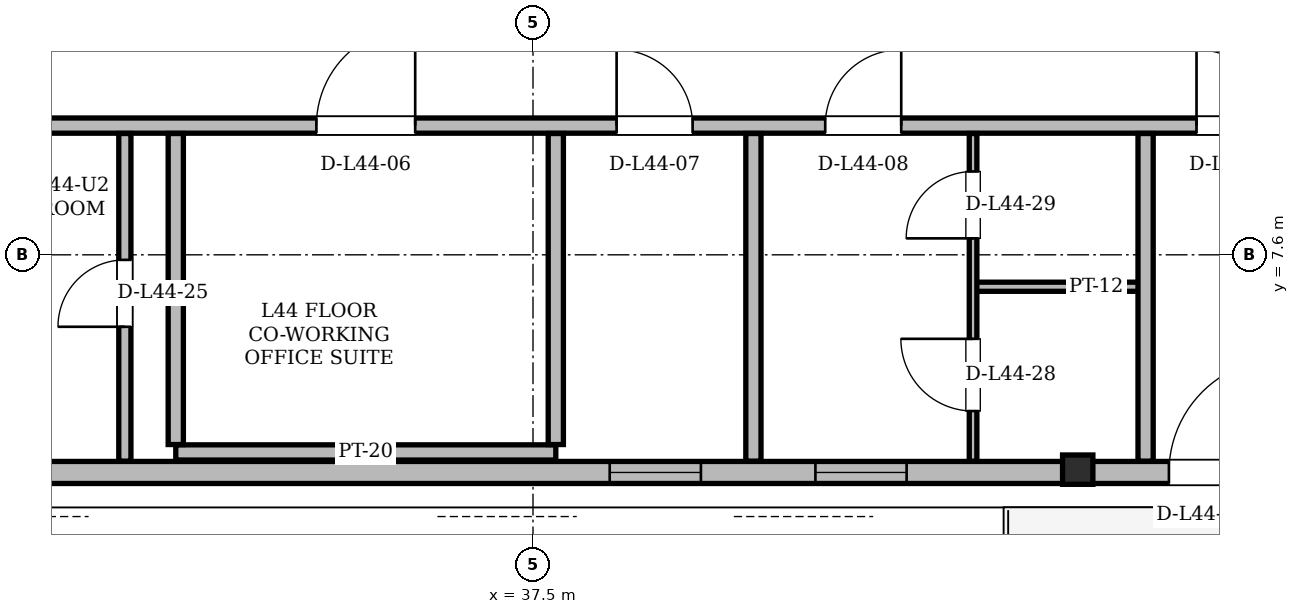
"""IFC4 building model, lengths in metres.
Left out: names, types, materials, properties, quantities, classifications, styles, units other than length and angle.
Written with IfcOpenShell. Run it as: python <this file> out.ifc"""

import sys

from ifc_helpers import new_model, si_unit, direction, frame, frame_2d, origin, origin_2d, place, context, subcontext, project, spatial, rectangle, i_section, extrude, element, fill, save


model = new_model("IFC4")
c1 = context("Model", 3, precision=1e-05, world=origin(), true_north=direction((0.0, 1.0)))
c2 = subcontext(c1, "Body", "Model", "MODEL_VIEW")
j1 = project(units=[si_unit("LENGTHUNIT", "METRE"), si_unit("PLANEANGLEUNIT", "RADIAN")], contexts=[c1])
p1 = place(None, origin())
s1 = spatial("IfcSite", under=j1, at=p1, CompositionType="ELEMENT")
p2 = place(p1, origin())
s2 = spatial("IfcBuilding", under=s1, at=p2, CompositionType="ELEMENT")
p3 = place(p2, frame((0.0, 0.0, 167.4)))
s3 = spatial("IfcBuildingStorey", under=s2, at=p3, CompositionType="ELEMENT", Elevation=167.4)
p4 = place(p3, frame((44.66, 4.737, 0.005), z_axis=(0.003602448474, 0.020595129955, 0.999781407602), x_axis=(-0.985044264362, 0.172301471984, 0.0)))
e1 = element("IfcColumn", 1, at=p4, inside=s3, PredefinedType="COLUMN", context=c2, shape_type="SweptSolid", body=[
    extrude(i_section(OverallWidth=0.399, OverallDepth=0.386, WebThickness=0.021, FlangeThickness=0.033, at=origin_2d()), origin(), (0.0, 0.0, 1.0), 3.592),
])
p5 = place(p3, frame((19.599, 4.737, 0.0), z_axis=(0.0, 0.0, 1.0), x_axis=(1.0, 0.0, 0.0)))
e2 = element("IfcWall", 2, at=p5, inside=s3, PredefinedType="SOLIDWALL", context=c2, shape_type="SweptSolid", body=[
    extrude(rectangle(XDim=35.803, YDim=0.29, at=frame_2d((17.901, 0.0))), origin(), (0.0, 0.0, 1.0), 2.6),
])
p6 = place(p5, frame((6.579, 0.0, 0.0)))
e3 = element("IfcOpeningElement", 3, at=p6, cuts=e2, PredefinedType="OPENING", context=c2, shape_type="SweptSolid", body=[
    extrude(rectangle(XDim=1.5, YDim=2.2, at=frame_2d((0.75, 1.1))), frame((0.0, 0.145, 0.0), z_axis=(0.0, -1.0, 0.0), x_axis=(1.0, 0.0, 0.0)), (0.0, 0.0, 1.0), 0.29),
])
p7 = place(p5, frame((26.268, 0.0, 0.0)))
e4 = element("IfcOpeningElement", 4, at=p7, cuts=e2, PredefinedType="OPENING", context=c2, shape_type="SweptSolid", body=[
    extrude(rectangle(XDim=1.5, YDim=2.2, at=frame_2d((0.75, 1.1))), frame((0.0, 0.145, 0.0), z_axis=(0.0, -1.0, 0.0), x_axis=(1.0, 0.0, 0.0)), (0.0, 0.0, 1.0), 0.29),
])
p8 = place(p5, frame((0.86, 0.0, 0.85)))
e5 = element("IfcOpeningElement", 5, at=p8, cuts=e2, PredefinedType="OPENING", context=c2, shape_type="SweptSolid", body=[
    extrude(rectangle(XDim=1.2, YDim=1.48, at=frame_2d((0.6, 0.74))), frame((0.0, 0.145, 0.0), z_axis=(0.0, -1.0, 0.0), x_axis=(1.0, 0.0, 0.0)), (0.0, 0.0, 1.0), 0.29),
])
p9 = place(p5, frame((8.588, 0.0, 0.85)))
e6 = element("IfcOpeningElement", 6, at=p9, cuts=e2, PredefinedType="OPENING", context=c2, shape_type="SweptSolid", body=[
    extrude(rectangle(XDim=1.2, YDim=1.48, at=frame_2d((0.6, 0.74))), frame((0.0, 0.145, 0.0), z_axis=(0.0, -1.0, 0.0), x_axis=(1.0, 0.0, 0.0)), (0.0, 0.0, 1.0), 0.29),
])
p10 = place(p5, frame((18.91, 0.0, 0.85)))
e7 = element("IfcOpeningElement", 7, at=p10, cuts=e2, PredefinedType="OPENING", context=c2, shape_type="SweptSolid", body=[
    extrude(rectangle(XDim=1.2, YDim=1.48, at=frame_2d((0.6, 0.74))), frame((0.0, 0.145, 0.0), z_axis=(0.0, -1.0, 0.0), x_axis=(1.0, 0.0, 0.0)), (0.0, 0.0, 1.0), 0.29),
])
p11 = place(p5, frame((31.267, 0.0, 0.85)))
e8 = element("IfcOpeningElement", 8, at=p11, cuts=e2, PredefinedType="OPENING", context=c2, shape_type="SweptSolid", body=[
    extrude(rectangle(XDim=3.0, YDim=1.64, at=frame_2d((1.5, 0.82))), frame((0.0, 0.145, 0.0), z_axis=(0.0, -1.0, 0.0), x_axis=(1.0, 0.0, 0.0)), (0.0, 0.0, 1.0), 0.29),
])
p12 = place(p5, frame((21.617, 0.0, 0.85)))
e9 = element("IfcOpeningElement", 9, at=p12, cuts=e2, PredefinedType="OPENING", context=c2, shape_type="SweptSolid", body=[
    extrude(rectangle(XDim=1.2, YDim=1.48, at=frame_2d((0.6, 0.74))), frame((0.0, 0.145, 0.0), z_axis=(0.0, -1.0, 0.0), x_axis=(1.0, 0.0, 0.0)), (0.0, 0.0, 1.0), 0.29),
])
p13 = place(p3, frame((32.8, 5.0, 0.0), z_axis=(0.0, 0.0, 1.0), x_axis=(1.0, 0.0, 0.0)))
e10 = element("IfcWall", 10, at=p13, inside=s3, PredefinedType="PARTITIONING", context=c2, shape_type="SweptSolid", body=[
    extrude(rectangle(XDim=5.0, YDim=0.2, at=frame_2d((2.5, 0.0))), origin(), (0.0, 0.0, 1.0), 2.6),
])
p14 = place(p3, frame((43.29, 7.18, 0.0), z_axis=(0.0, 0.0, 1.0), x_axis=(1.0, 0.0, 0.0)))
e11 = element("IfcWall", 11, at=p14, inside=s3, PredefinedType="PARTITIONING", context=c2, shape_type="SweptSolid", body=[
    extrude(rectangle(XDim=2.321, YDim=0.12, at=frame_2d((1.16, 0.0))), origin(), (0.0, 0.0, 1.0), 3.38),
])
p15 = place(p3, frame((27.55, 9.3, 0.0), z_axis=(0.0, 0.0, 1.0), x_axis=(1.0, 0.0, 0.0)))
e12 = element("IfcWall", 12, at=p15, inside=s3, PredefinedType="PARTITIONING", context=c2, shape_type="SweptSolid", body=[
    extrude(rectangle(XDim=21.25, YDim=0.2, at=frame_2d((10.625, 0.0))), origin(), (0.0, 0.0, 1.0), 2.842),
])
p16 = place(p15, frame((0.429, 0.0, 0.0)))
e13 = element("IfcOpeningElement", 13, at=p16, cuts=e12, PredefinedType="OPENING", context=c2, shape_type="SweptSolid", body=[
    extrude(rectangle(XDim=1.0, YDim=2.18, at=frame_2d((0.5, 1.09))), frame((0.0, 0.1, 0.0), z_axis=(0.0, -1.0, 0.0), x_axis=(1.0, 0.0, 0.0)), (0.0, 0.0, 1.0), 0.2),
])
p17 = place(p15, frame((7.1, 0.0, 0.0)))
e14 = element("IfcOpeningElement", 14, at=p17, cuts=e12, PredefinedType="OPENING", context=c2, shape_type="SweptSolid", body=[
    extrude(rectangle(XDim=1.3, YDim=2.2, at=frame_2d((0.65, 1.1))), frame((0.0, 0.1, 0.0), z_axis=(0.0, -1.0, 0.0), x_axis=(1.0, 0.0, 0.0)), (0.0, 0.0, 1.0), 0.2),
])
p18 = place(p15, frame((11.05, 0.0, 0.0)))
e15 = element("IfcOpeningElement", 15, at=p18, cuts=e12, PredefinedType="OPENING", context=c2, shape_type="SweptSolid", body=[
    extrude(rectangle(XDim=1.0, YDim=2.18, at=frame_2d((0.5, 1.09))), frame((0.0, 0.1, 0.0), z_axis=(0.0, -1.0, 0.0), x_axis=(1.0, 0.0, 0.0)), (0.0, 0.0, 1.0), 0.2),
])
p19 = place(p15, frame((13.795, 0.0, 0.0)))
e16 = element("IfcOpeningElement", 16, at=p19, cuts=e12, PredefinedType="OPENING", context=c2, shape_type="SweptSolid", body=[
    extrude(rectangle(XDim=1.0, YDim=2.18, at=frame_2d((0.5, 1.09))), frame((0.0, 0.1, 0.0), z_axis=(0.0, -1.0, 0.0), x_axis=(1.0, 0.0, 0.0)), (0.0, 0.0, 1.0), 0.2),
])
p20 = place(p15, frame((18.68, 0.0, 0.0)))
e17 = element("IfcOpeningElement", 17, at=p20, cuts=e12, PredefinedType="OPENING", context=c2, shape_type="SweptSolid", body=[
    extrude(rectangle(XDim=1.0, YDim=2.18, at=frame_2d((0.5, 1.09))), frame((0.0, 0.1, 0.0), z_axis=(0.0, -1.0, 0.0), x_axis=(1.0, 0.0, 0.0)), (0.0, 0.0, 1.0), 0.2),
])
p21 = place(p3, frame((32.13, 4.885, 0.0), z_axis=(0.0, 0.0, 1.0), x_axis=(0.0, 1.0, 0.0)))
e18 = element("IfcWall", 18, at=p21, inside=s3, PredefinedType="PARTITIONING", context=c2, shape_type="SweptSolid", body=[
    extrude(rectangle(XDim=4.311, YDim=0.16, at=frame_2d((2.155, 0.0))), origin(), (0.0, 0.0, 1.0), 2.966),
])
p22 = place(p21, frame((1.768, 0.0, 0.0)))
e19 = element("IfcOpeningElement", 19, at=p22, cuts=e18, PredefinedType="OPENING", context=c2, shape_type="SweptSolid", body=[
    extrude(rectangle(XDim=0.88, YDim=2.08, at=frame_2d((0.44, 1.04))), frame((0.0, 0.08, 0.0), z_axis=(0.0, -1.0, 0.0), x_axis=(1.0, 0.0, 0.0)), (0.0, 0.0, 1.0), 0.16),
])
p23 = place(p3, frame((32.8, 5.104, 0.0), z_axis=(0.0, 0.0, 1.0), x_axis=(0.0, 1.0, 0.0)))
e20 = element("IfcWall", 20, at=p23, inside=s3, PredefinedType="PARTITIONING", context=c2, shape_type="SweptSolid", body=[
    extrude(rectangle(XDim=4.092, YDim=0.2, at=frame_2d((2.046, 0.0))), origin(), (0.0, 0.0, 1.0), 2.966),
])
p24 = place(p3, frame((37.8, 5.104, 0.0), z_axis=(0.0, 0.0, 1.0), x_axis=(0.0, 1.0, 0.0)))
e21 = element("IfcWall", 21, at=p24, inside=s3, PredefinedType="PARTITIONING", context=c2, shape_type="SweptSolid", body=[
    extrude(rectangle(XDim=4.092, YDim=0.2, at=frame_2d((2.046, 0.0))), origin(), (0.0, 0.0, 1.0), 3.38),
])
p25 = place(p3, frame((40.4, 4.885, 0.0), z_axis=(0.0, 0.0, 1.0), x_axis=(0.0, 1.0, 0.0)))
e22 = element("IfcWall", 22, at=p25, inside=s3, PredefinedType="PARTITIONING", context=c2, shape_type="SweptSolid", body=[
    extrude(rectangle(XDim=4.311, YDim=0.2, at=frame_2d((2.155, 0.0))), origin(), (0.0, 0.0, 1.0), 3.38),
])
p26 = place(p3, frame((43.29, 4.885, 0.0), z_axis=(0.0, 0.0, 1.0), x_axis=(0.0, 1.0, 0.0)))
e23 = element("IfcWall", 23, at=p26, inside=s3, PredefinedType="PARTITIONING", context=c2, shape_type="SweptSolid", body=[
    extrude(rectangle(XDim=4.311, YDim=0.1, at=frame_2d((2.155, 0.0))), origin(), (0.0, 0.0, 1.0), 2.966),
])
p27 = place(p26, frame((0.659, 0.0, 0.0)))
e24 = element("IfcOpeningElement", 24, at=p27, cuts=e23, PredefinedType="OPENING", context=c2, shape_type="SweptSolid", body=[
    extrude(rectangle(XDim=0.95, YDim=2.1, at=frame_2d((0.475, 1.05))), frame((0.0, 0.05, 0.0), z_axis=(0.0, -1.0, 0.0), x_axis=(1.0, 0.0, 0.0)), (0.0, 0.0, 1.0), 0.1),
])
p28 = place(p26, frame((2.931, 0.0, 0.0)))
e25 = element("IfcOpeningElement", 25, at=p28, cuts=e23, PredefinedType="OPENING", context=c2, shape_type="SweptSolid", body=[
    extrude(rectangle(XDim=0.88, YDim=2.08, at=frame_2d((0.44, 1.04))), frame((0.0, 0.05, 0.0), z_axis=(0.0, -1.0, 0.0), x_axis=(1.0, 0.0, 0.0)), (0.0, 0.0, 1.0), 0.1),
])
p29 = place(p3, frame((45.56, 4.885, 0.0), z_axis=(0.0, 0.0, 1.0), x_axis=(0.0, 1.0, 0.0)))
e26 = element("IfcWall", 26, at=p29, inside=s3, PredefinedType="PARTITIONING", context=c2, shape_type="SweptSolid", body=[
    extrude(rectangle(XDim=4.311, YDim=0.2, at=frame_2d((2.155, 0.0))), origin(), (0.0, 0.0, 1.0), 2.966),
])
p30 = place(p7, origin())
e27 = element("IfcDoor", 27, at=p30, inside=s3, OperationType="SINGLE_SWING_RIGHT", PredefinedType="DOOR", context=c2, shape_type="SweptSolid", body=[
    extrude(rectangle(XDim=1.5, YDim=2.2, at=frame_2d((0.75, 1.1))), frame((0.0, 0.025, 0.0), z_axis=(0.0, -1.0, 0.0), x_axis=(1.0, 0.0, 0.0)), (0.0, 0.0, 1.0), 0.05),
])
fill(e4, e27)
p31 = place(p10, origin())
e28 = element("IfcWindow", 28, at=p31, inside=s3, PartitioningType="SINGLE_PANEL", PredefinedType="WINDOW", context=c2, shape_type="SweptSolid", body=[
    extrude(rectangle(XDim=1.2, YDim=1.48, at=frame_2d((0.6, 0.74))), frame((0.0, 0.03, 0.0), z_axis=(0.0, -1.0, 0.0), x_axis=(1.0, 0.0, 0.0)), (0.0, 0.0, 1.0), 0.06),
])
fill(e7, e28)
p32 = place(p12, origin())
e29 = element("IfcWindow", 29, at=p32, inside=s3, PartitioningType="SINGLE_PANEL", PredefinedType="WINDOW", context=c2, shape_type="SweptSolid", body=[
    extrude(rectangle(XDim=1.2, YDim=1.48, at=frame_2d((0.6, 0.74))), frame((0.0, 0.03, 0.0), z_axis=(0.0, -1.0, 0.0), x_axis=(1.0, 0.0, 0.0)), (0.0, 0.0, 1.0), 0.06),
])
fill(e9, e29)
p33 = place(p17, origin())
e30 = element("IfcDoor", 30, at=p33, inside=s3, OperationType="SINGLE_SWING_RIGHT", PredefinedType="DOOR", context=c2, shape_type="SweptSolid", body=[
    extrude(rectangle(XDim=1.3, YDim=2.2, at=frame_2d((0.65, 1.1))), frame((0.0, 0.025, 0.0), z_axis=(0.0, -1.0, 0.0), x_axis=(1.0, 0.0, 0.0)), (0.0, 0.0, 1.0), 0.05),
])
fill(e14, e30)
p34 = place(p18, origin())
e31 = element("IfcDoor", 31, at=p34, inside=s3, OperationType="SINGLE_SWING_LEFT", PredefinedType="DOOR", context=c2, shape_type="SweptSolid", body=[
    extrude(rectangle(XDim=1.0, YDim=2.18, at=frame_2d((0.5, 1.09))), frame((0.0, 0.025, 0.0), z_axis=(0.0, -1.0, 0.0), x_axis=(1.0, 0.0, 0.0)), (0.0, 0.0, 1.0), 0.05),
])
fill(e15, e31)
p35 = place(p19, origin())
e32 = element("IfcDoor", 32, at=p35, inside=s3, OperationType="SINGLE_SWING_RIGHT", PredefinedType="DOOR", context=c2, shape_type="SweptSolid", body=[
    extrude(rectangle(XDim=1.0, YDim=2.18, at=frame_2d((0.5, 1.09))), frame((0.0, 0.025, 0.0), z_axis=(0.0, -1.0, 0.0), x_axis=(1.0, 0.0, 0.0)), (0.0, 0.0, 1.0), 0.05),
])
fill(e16, e32)
p36 = place(p20, origin())
e33 = element("IfcDoor", 33, at=p36, inside=s3, OperationType="SINGLE_SWING_LEFT", PredefinedType="DOOR", context=c2, shape_type="SweptSolid", body=[
    extrude(rectangle(XDim=1.0, YDim=2.18, at=frame_2d((0.5, 1.09))), frame((0.0, 0.025, 0.0), z_axis=(0.0, -1.0, 0.0), x_axis=(1.0, 0.0, 0.0)), (0.0, 0.0, 1.0), 0.05),
])
fill(e17, e33)
p37 = place(p22, origin())
e34 = element("IfcDoor", 34, at=p37, inside=s3, OperationType="SINGLE_SWING_LEFT", PredefinedType="DOOR", context=c2, shape_type="SweptSolid", body=[
    extrude(rectangle(XDim=0.88, YDim=2.08, at=frame_2d((0.44, 1.04))), frame((0.0, 0.025, 0.0), z_axis=(0.0, -1.0, 0.0), x_axis=(1.0, 0.0, 0.0)), (0.0, 0.0, 1.0), 0.05),
])
fill(e19, e34)
p38 = place(p27, origin())
e35 = element("IfcDoor", 35, at=p38, inside=s3, OperationType="SINGLE_SWING_RIGHT", PredefinedType="DOOR", context=c2, shape_type="SweptSolid", body=[
    extrude(rectangle(XDim=0.95, YDim=2.1, at=frame_2d((0.475, 1.05))), frame((0.0, 0.025, 0.0), z_axis=(0.0, -1.0, 0.0), x_axis=(1.0, 0.0, 0.0)), (0.0, 0.0, 1.0), 0.05),
])
fill(e24, e35)
p39 = place(p28, origin())
e36 = element("IfcDoor", 36, at=p39, inside=s3, OperationType="SINGLE_SWING_LEFT", PredefinedType="DOOR", context=c2, shape_type="SweptSolid", body=[
    extrude(rectangle(XDim=0.88, YDim=2.08, at=frame_2d((0.44, 1.04))), frame((0.0, 0.025, 0.0), z_axis=(0.0, -1.0, 0.0), x_axis=(1.0, 0.0, 0.0)), (0.0, 0.0, 1.0), 0.05),
])
fill(e25, e36)
save(model, sys.argv[1])
